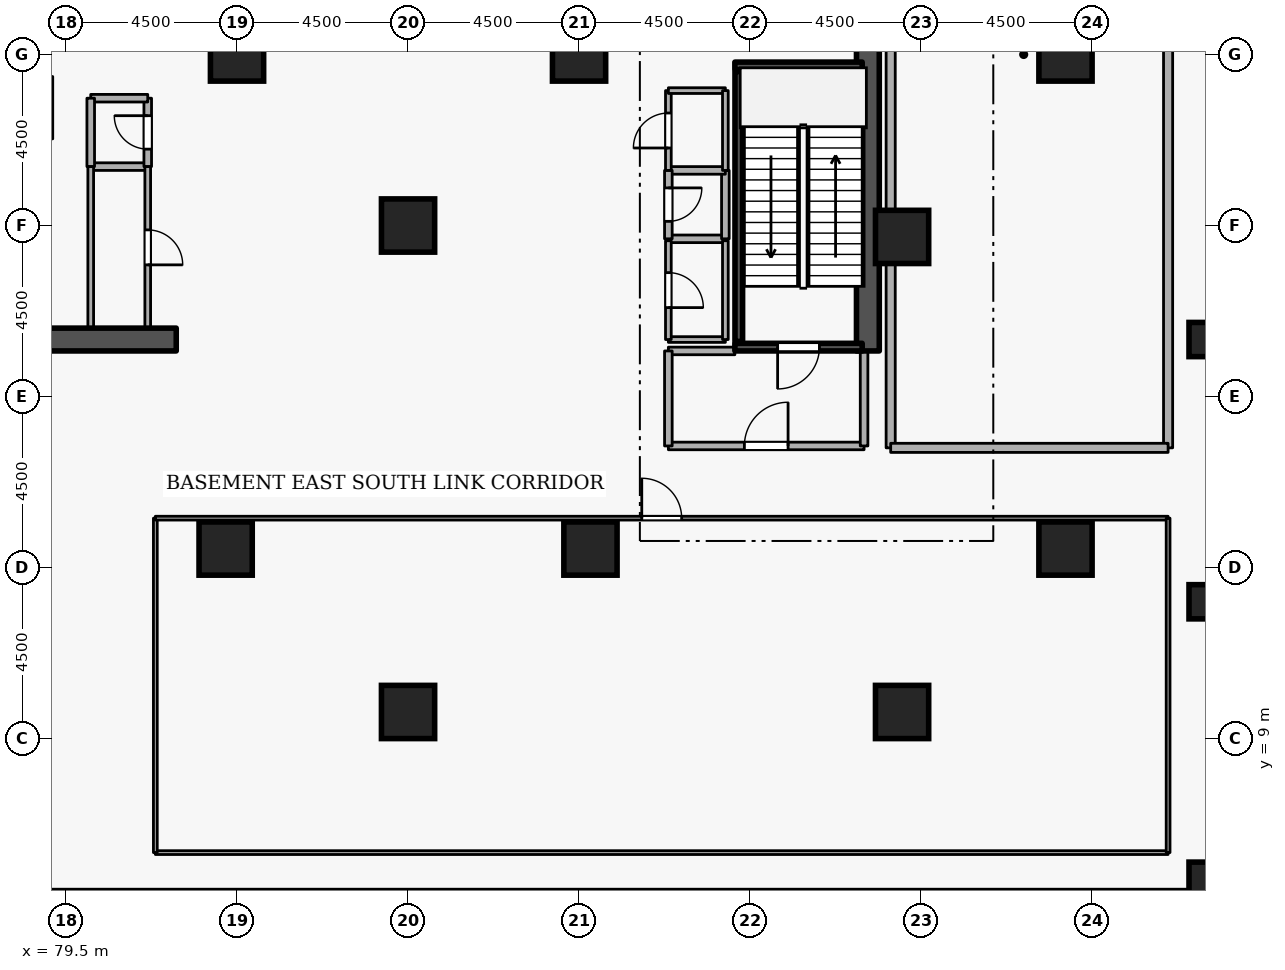
"""IFC4 building model, lengths in metres.
Left out: names, types, materials, properties, quantities, classifications, styles, units other than length and angle.
Written with IfcOpenShell. Run it as: python <this file> out.ifc"""

import sys

from ifc_helpers import new_model, si_unit, direction, frame, frame_2d, origin, origin_2d, place, context, subcontext, project, spatial, rectangle, extrude, element, fill, save


model = new_model("IFC4")
c1 = context("Model", 3, precision=1e-05, world=origin(), true_north=direction((0.0, 1.0)))
c2 = subcontext(c1, "Body", "Model", "MODEL_VIEW")
j1 = project(units=[si_unit("LENGTHUNIT", "METRE"), si_unit("PLANEANGLEUNIT", "RADIAN")], contexts=[c1])
p1 = place(None, origin())
s1 = spatial("IfcSite", under=j1, at=p1, CompositionType="ELEMENT")
p2 = place(p1, origin())
s2 = spatial("IfcBuilding", under=s1, at=p2, CompositionType="ELEMENT")
p3 = place(p2, frame((0.0, 0.0, -5.4)))
s3 = spatial("IfcBuildingStorey", under=s2, at=p3, CompositionType="ELEMENT", Elevation=-5.4)
p4 = place(p3, frame((100.6, 19.2, -0.6), z_axis=(0.0, 0.0, 1.0), x_axis=(0.0, 1.0, 0.0)))
e1 = element("IfcWall", 1, at=p4, inside=s3, PredefinedType="SHEAR", context=c2, shape_type="SweptSolid", body=[
    extrude(rectangle(XDim=15.6, YDim=0.6, at=frame_2d((7.8, 0.0))), origin(), (0.0, 0.0, 1.0), 6.0),
])
p5 = place(p3, frame((76.7, 19.5, -0.6), z_axis=(0.0, 0.0, 1.0), x_axis=(1.0, 0.0, 0.0)))
e2 = element("IfcWall", 2, at=p5, inside=s3, PredefinedType="SHEAR", context=c2, shape_type="SweptSolid", body=[
    extrude(rectangle(XDim=5.7, YDim=0.6, at=frame_2d((2.85, 0.0))), origin(), (0.0, 0.0, 1.0), 6.0),
])
for number, where, z_axis, x_axis in (
    (3, (105.8, 14.0, -0.6), (0.0, 0.0, 1.0), (1.0, 0.0, 0.0)),
    (4, (105.8, 27.0, -0.6), (0.0, 0.0, 1.0), (1.0, 0.0, 0.0)),
    (5, (101.5, 9.7, -0.6), (0.0, 0.0, 1.0), (1.0, 0.0, 0.0)),
    (6, (88.5, 9.7, -0.6), (0.0, 0.0, 1.0), (1.0, 0.0, 0.0)),
    (7, (93.3, 14.0, -0.6), (0.0, 0.0, 1.0), (1.0, 0.0, 0.0)),
    (8, (83.7, 14.0, -0.6), (0.0, 0.0, 1.0), (1.0, 0.0, 0.0)),
    (9, (101.5, 22.2, -0.6), (0.0, 0.0, 1.0), (1.0, 0.0, 0.0)),
    (10, (93.0, 27.0, -0.6), (0.0, 0.0, 1.0), (1.0, 0.0, 0.0)),
    (11, (84.0, 27.0, -0.6), (0.0, 0.0, 1.0), (1.0, 0.0, 0.0)),
    (12, (88.5, 22.5, -0.6), (0.0, 0.0, 1.0), (1.0, 0.0, 0.0)),
):
    element("IfcColumn", number, at=place(p3, frame(where, z_axis=z_axis, x_axis=x_axis)), inside=s3, PredefinedType="COLUMN", context=c2, shape_type="SweptSolid", body=[
        extrude(rectangle(XDim=1.4, YDim=1.4, at=origin_2d()), origin(), (0.0, 0.0, 1.0), 6.0),
    ])
for number, where, z_axis, x_axis in (
    (13, (109.5, 5.3, -0.6), (0.0, 0.0, 1.0), (1.0, 0.0, 0.0)),
    (14, (109.5, 12.6, -0.6), (0.0, 0.0, 1.0), (1.0, 0.0, 0.0)),
    (15, (109.5, 19.5, -0.6), (0.0, 0.0, 1.0), (1.0, 0.0, 0.0)),
):
    element("IfcColumn", number, at=place(p3, frame(where, z_axis=z_axis, x_axis=x_axis)), inside=s3, PredefinedType="COLUMN", context=c2, shape_type="SweptSolid", body=[
        extrude(rectangle(XDim=0.9, YDim=0.9, at=origin_2d()), origin(), (0.0, 0.0, 1.0), 6.0),
    ])
p6 = place(p3, frame((79.05, 24.78, 0.0), z_axis=(0.0, 0.0, 1.0), x_axis=(0.0, 1.0, 0.0)))
e16 = element("IfcWall", 16, at=p6, inside=s3, PredefinedType="STANDARD", context=c2, shape_type="SweptSolid", body=[
    extrude(rectangle(XDim=1.64, YDim=0.2, at=frame_2d((0.82, 0.0))), origin(), (0.0, 0.0, 1.0), 5.06),
])
p7 = place(p6, frame((0.31, 0.0, 0.0)))
e17 = element("IfcOpeningElement", 17, at=p7, cuts=e16, PredefinedType="OPENING", context=c2, shape_type="SweptSolid", body=[
    extrude(rectangle(XDim=1.02, YDim=2.06, at=frame_2d((0.51, 1.03))), frame((0.0, 0.11, 0.0), z_axis=(0.0, -1.0, 0.0), x_axis=(1.0, 0.0, 0.0)), (0.0, 0.0, 1.0), 0.22),
])
p8 = place(p3, frame((100.45, 19.3, -0.6), z_axis=(0.0, 0.0, 1.0), x_axis=(-1.0, 0.0, 0.0)))
e18 = element("IfcWall", 18, at=p8, inside=s3, PredefinedType="SHEAR", context=c2, shape_type="SweptSolid", body=[
    extrude(rectangle(XDim=3.35, YDim=0.2, at=frame_2d((1.675, 0.0))), origin(), (0.0, 0.0, 1.0), 6.0),
])
p9 = place(p8, frame((1.125, 0.0, 0.6)))
e19 = element("IfcOpeningElement", 19, at=p9, cuts=e18, PredefinedType="OPENING", context=c2, shape_type="SweptSolid", body=[
    extrude(rectangle(XDim=1.1, YDim=2.1, at=frame_2d((0.55, 1.05))), frame((0.0, 0.11, 0.0), z_axis=(0.0, -1.0, 0.0), x_axis=(1.0, 0.0, 0.0)), (0.0, 0.0, 1.0), 0.22),
])
p10 = place(p3, frame((97.1, 26.7, -0.6), z_axis=(0.0, 0.0, 1.0), x_axis=(1.0, 0.0, 0.0)))
e20 = element("IfcWall", 20, at=p10, inside=s3, PredefinedType="SHEAR", context=c2, shape_type="SweptSolid", body=[
    extrude(rectangle(XDim=3.35, YDim=0.2, at=frame_2d((1.675, 0.0))), origin(), (0.0, 0.0, 1.0), 6.0),
])
p11 = place(p3, frame((97.203, 26.55, -0.6), z_axis=(0.0, 0.0, 1.0), x_axis=(0.0, -1.0, 0.0)))
e21 = element("IfcWall", 21, at=p11, inside=s3, PredefinedType="SHEAR", context=c2, shape_type="SweptSolid", body=[
    extrude(rectangle(XDim=7.1, YDim=0.2, at=frame_2d((3.55, 0.0))), origin(), (0.0, 0.0, 1.0), 6.0),
])
p12 = place(p3, frame((95.35, 16.7, 0.0), z_axis=(0.0, 0.0, 1.0), x_axis=(1.0, 0.0, 0.0)))
e22 = element("IfcWall", 22, at=p12, inside=s3, PredefinedType="STANDARD", context=c2, shape_type="SweptSolid", body=[
    extrude(rectangle(XDim=5.15, YDim=0.2, at=frame_2d((2.575, 0.0))), origin(), (0.0, 0.0, 1.0), 5.06),
])
p13 = place(p12, frame((2.0, 0.0, 0.0)))
e23 = element("IfcOpeningElement", 23, at=p13, cuts=e22, PredefinedType="OPENING", context=c2, shape_type="SweptSolid", body=[
    extrude(rectangle(XDim=1.15, YDim=2.1, at=frame_2d((0.575, 1.05))), frame((0.0, 0.11, 0.0), z_axis=(0.0, -1.0, 0.0), x_axis=(1.0, 0.0, 0.0)), (0.0, 0.0, 1.0), 0.22),
])
p14 = place(p3, frame((100.5, 16.7, 0.0), z_axis=(0.0, 0.0, 1.0), x_axis=(0.0, 1.0, 0.0)))
e24 = element("IfcWall", 24, at=p14, inside=s3, PredefinedType="STANDARD", context=c2, shape_type="SweptSolid", body=[
    extrude(rectangle(XDim=2.5, YDim=0.2, at=frame_2d((1.25, 0.0))), origin(), (0.0, 0.0, 1.0), 5.06),
])
p15 = place(p3, frame((97.1, 19.2, 0.0), z_axis=(0.0, 0.0, 1.0), x_axis=(-1.0, 0.0, 0.0)))
e25 = element("IfcWall", 25, at=p15, inside=s3, PredefinedType="STANDARD", context=c2, shape_type="SweptSolid", body=[
    extrude(rectangle(XDim=1.75, YDim=0.2, at=frame_2d((0.875, 0.0))), origin(), (0.0, 0.0, 1.0), 4.265),
])
p16 = place(p3, frame((95.35, 19.2, 0.0), z_axis=(0.0, 0.0, 1.0), x_axis=(0.0, -1.0, 0.0)))
e26 = element("IfcWall", 26, at=p16, inside=s3, PredefinedType="STANDARD", context=c2, shape_type="SweptSolid", body=[
    extrude(rectangle(XDim=2.5, YDim=0.2, at=frame_2d((1.25, 0.0))), origin(), (0.0, 0.0, 1.0), 5.06),
])
p17 = place(p3, frame((95.35, 22.15, 0.0), z_axis=(0.0, 0.0, 1.0), x_axis=(1.0, 0.0, 0.0)))
e27 = element("IfcWall", 27, at=p17, inside=s3, PredefinedType="STANDARD", context=c2, shape_type="SweptSolid", body=[
    extrude(rectangle(XDim=1.5, YDim=0.2, at=frame_2d((0.75, 0.0))), origin(), (0.0, 0.0, 1.0), 5.06),
])
p18 = place(p3, frame((96.85, 22.15, 0.0), z_axis=(0.0, 0.0, 1.0), x_axis=(0.0, 1.0, 0.0)))
e28 = element("IfcWall", 28, at=p18, inside=s3, PredefinedType="STANDARD", context=c2, shape_type="SweptSolid", body=[
    extrude(rectangle(XDim=1.8, YDim=0.2, at=frame_2d((0.9, 0.0))), origin(), (0.0, 0.0, 1.0), 5.06),
])
p19 = place(p3, frame((96.85, 23.95, 0.0), z_axis=(0.0, 0.0, 1.0), x_axis=(-1.0, 0.0, 0.0)))
e29 = element("IfcWall", 29, at=p19, inside=s3, PredefinedType="STANDARD", context=c2, shape_type="SweptSolid", body=[
    extrude(rectangle(XDim=1.5, YDim=0.2, at=frame_2d((0.75, 0.0))), origin(), (0.0, 0.0, 1.0), 5.06),
])
p20 = place(p3, frame((95.35, 23.95, 0.0), z_axis=(0.0, 0.0, 1.0), x_axis=(0.0, -1.0, 0.0)))
e30 = element("IfcWall", 30, at=p20, inside=s3, PredefinedType="STANDARD", context=c2, shape_type="SweptSolid", body=[
    extrude(rectangle(XDim=1.8, YDim=0.2, at=frame_2d((0.9, 0.0))), origin(), (0.0, 0.0, 1.0), 5.06),
])
p21 = place(p20, frame((0.46, 0.0, 0.0)))
e31 = element("IfcOpeningElement", 31, at=p21, cuts=e30, PredefinedType="OPENING", context=c2, shape_type="SweptSolid", body=[
    extrude(rectangle(XDim=0.88, YDim=2.04, at=frame_2d((0.44, 1.02))), frame((0.0, 0.11, 0.0), z_axis=(0.0, -1.0, 0.0), x_axis=(1.0, 0.0, 0.0)), (0.0, 0.0, 1.0), 0.22),
])
p22 = place(p3, frame((80.15, 24.05, 0.0), z_axis=(0.0, 0.0, 1.0), x_axis=(1.0, 0.0, 0.0)))
e32 = element("IfcWall", 32, at=p22, inside=s3, PredefinedType="STANDARD", context=c2, shape_type="SweptSolid", body=[
    extrude(rectangle(XDim=1.5, YDim=0.2, at=frame_2d((0.75, 0.0))), origin(), (0.0, 0.0, 1.0), 5.06),
])
p23 = place(p3, frame((81.65, 24.05, 0.0), z_axis=(0.0, 0.0, 1.0), x_axis=(0.0, 1.0, 0.0)))
e33 = element("IfcWall", 33, at=p23, inside=s3, PredefinedType="STANDARD", context=c2, shape_type="SweptSolid", body=[
    extrude(rectangle(XDim=1.8, YDim=0.2, at=frame_2d((0.9, 0.0))), origin(), (0.0, 0.0, 1.0), 5.06),
])
p24 = place(p23, frame((0.46, 0.0, 0.0)))
e34 = element("IfcOpeningElement", 34, at=p24, cuts=e33, PredefinedType="OPENING", context=c2, shape_type="SweptSolid", body=[
    extrude(rectangle(XDim=0.88, YDim=2.04, at=frame_2d((0.44, 1.02))), frame((0.0, 0.11, 0.0), z_axis=(0.0, -1.0, 0.0), x_axis=(1.0, 0.0, 0.0)), (0.0, 0.0, 1.0), 0.22),
])
p25 = place(p3, frame((81.65, 25.85, 0.0), z_axis=(0.0, 0.0, 1.0), x_axis=(-1.0, 0.0, 0.0)))
e35 = element("IfcWall", 35, at=p25, inside=s3, PredefinedType="STANDARD", context=c2, shape_type="SweptSolid", body=[
    extrude(rectangle(XDim=1.5, YDim=0.2, at=frame_2d((0.75, 0.0))), origin(), (0.0, 0.0, 1.0), 5.06),
])
p26 = place(p3, frame((80.15, 25.85, 0.0), z_axis=(0.0, 0.0, 1.0), x_axis=(0.0, -1.0, 0.0)))
e36 = element("IfcWall", 36, at=p26, inside=s3, PredefinedType="STANDARD", context=c2, shape_type="SweptSolid", body=[
    extrude(rectangle(XDim=1.8, YDim=0.2, at=frame_2d((0.9, 0.0))), origin(), (0.0, 0.0, 1.0), 5.06),
])
for number, where, z_axis, x_axis in (
    (37, (101.2, 16.65, 0.0), (0.0, 0.0, 1.0), (0.0, 1.0, 0.0)),
    (38, (108.5, 40.8, 0.0), (0.0, 0.0, 1.0), (0.0, -1.0, 0.0)),
):
    element("IfcWall", number, at=place(p3, frame(where, z_axis=z_axis, x_axis=x_axis)), inside=s3, PredefinedType="STANDARD", context=c2, shape_type="SweptSolid", body=[
        extrude(rectangle(XDim=24.15, YDim=0.24, at=frame_2d((12.075, 0.0))), origin(), (0.0, 0.0, 1.0), 5.06),
    ])
p27 = place(p3, frame((108.5, 16.65, 0.0), z_axis=(0.0, 0.0, 1.0), x_axis=(-1.0, 0.0, 0.0)))
e39 = element("IfcWall", 39, at=p27, inside=s3, PredefinedType="STANDARD", context=c2, shape_type="SweptSolid", body=[
    extrude(rectangle(XDim=7.3, YDim=0.24, at=frame_2d((3.65, 0.0))), origin(), (0.0, 0.0, 1.0), 5.06),
])
p28 = place(p3, frame((95.35, 19.5, 0.0), z_axis=(0.0, 0.0, 1.0), x_axis=(1.0, 0.0, 0.0)))
e40 = element("IfcWall", 40, at=p28, inside=s3, PredefinedType="PARTITIONING", context=c2, shape_type="SweptSolid", body=[
    extrude(rectangle(XDim=1.5, YDim=0.15, at=frame_2d((0.75, 0.0))), origin(), (0.0, 0.0, 1.0), 4.265),
])
p29 = place(p3, frame((96.85, 19.5, 0.0), z_axis=(0.0, 0.0, 1.0), x_axis=(0.0, 1.0, 0.0)))
e41 = element("IfcWall", 41, at=p29, inside=s3, PredefinedType="PARTITIONING", context=c2, shape_type="SweptSolid", body=[
    extrude(rectangle(XDim=2.6, YDim=0.15, at=frame_2d((1.3, 0.0))), origin(), (0.0, 0.0, 1.0), 5.06),
])
p30 = place(p3, frame((95.35, 22.1, 0.0), z_axis=(0.0, 0.0, 1.0), x_axis=(0.0, -1.0, 0.0)))
e42 = element("IfcWall", 42, at=p30, inside=s3, PredefinedType="PARTITIONING", context=c2, shape_type="SweptSolid", body=[
    extrude(rectangle(XDim=2.6, YDim=0.15, at=frame_2d((1.3, 0.0))), origin(), (0.0, 0.0, 1.0), 5.06),
])
p31 = place(p30, frame((0.84, 0.0, 0.0)))
e43 = element("IfcOpeningElement", 43, at=p31, cuts=e42, PredefinedType="OPENING", context=c2, shape_type="SweptSolid", body=[
    extrude(rectangle(XDim=0.92, YDim=2.08, at=frame_2d((0.46, 1.04))), frame((0.0, 0.085, 0.0), z_axis=(0.0, -1.0, 0.0), x_axis=(1.0, 0.0, 0.0)), (0.0, 0.0, 1.0), 0.17),
])
p32 = place(p3, frame((95.35, 23.95, 0.0), z_axis=(0.0, 0.0, 1.0), x_axis=(0.0, 1.0, 0.0)))
e44 = element("IfcWall", 44, at=p32, inside=s3, PredefinedType="PARTITIONING", context=c2, shape_type="SweptSolid", body=[
    extrude(rectangle(XDim=2.1, YDim=0.15, at=frame_2d((1.05, 0.0))), origin(), (0.0, 0.0, 1.0), 5.06),
])
p33 = place(p32, frame((0.59, 0.0, 0.0)))
e45 = element("IfcOpeningElement", 45, at=p33, cuts=e44, PredefinedType="OPENING", context=c2, shape_type="SweptSolid", body=[
    extrude(rectangle(XDim=0.92, YDim=2.08, at=frame_2d((0.46, 1.04))), frame((0.0, 0.085, 0.0), z_axis=(0.0, -1.0, 0.0), x_axis=(1.0, 0.0, 0.0)), (0.0, 0.0, 1.0), 0.17),
])
p34 = place(p3, frame((95.35, 26.05, 0.0), z_axis=(0.0, 0.0, 1.0), x_axis=(1.0, 0.0, 0.0)))
e46 = element("IfcWall", 46, at=p34, inside=s3, PredefinedType="PARTITIONING", context=c2, shape_type="SweptSolid", body=[
    extrude(rectangle(XDim=1.5, YDim=0.15, at=frame_2d((0.75, 0.0))), origin(), (0.0, 0.0, 1.0), 5.06),
])
p35 = place(p3, frame((96.85, 26.05, 0.0), z_axis=(0.0, 0.0, 1.0), x_axis=(0.0, -1.0, 0.0)))
e47 = element("IfcWall", 47, at=p35, inside=s3, PredefinedType="PARTITIONING", context=c2, shape_type="SweptSolid", body=[
    extrude(rectangle(XDim=2.1, YDim=0.15, at=frame_2d((1.05, 0.0))), origin(), (0.0, 0.0, 1.0), 5.06),
])
p36 = place(p3, frame((80.15, 19.8, 0.0), z_axis=(0.0, 0.0, 1.0), x_axis=(0.0, 1.0, 0.0)))
e48 = element("IfcWall", 48, at=p36, inside=s3, PredefinedType="PARTITIONING", context=c2, shape_type="SweptSolid", body=[
    extrude(rectangle(XDim=4.25, YDim=0.15, at=frame_2d((2.125, 0.0))), origin(), (0.0, 0.0, 1.0), 5.06),
])
p37 = place(p3, frame((81.65, 24.05, 0.0), z_axis=(0.0, 0.0, 1.0), x_axis=(0.0, -1.0, 0.0)))
e49 = element("IfcWall", 49, at=p37, inside=s3, PredefinedType="PARTITIONING", context=c2, shape_type="SweptSolid", body=[
    extrude(rectangle(XDim=4.25, YDim=0.15, at=frame_2d((2.125, 0.0))), origin(), (0.0, 0.0, 1.0), 5.06),
])
p38 = place(p37, frame((1.665, 0.0, 0.0)))
e50 = element("IfcOpeningElement", 50, at=p38, cuts=e49, PredefinedType="OPENING", context=c2, shape_type="SweptSolid", body=[
    extrude(rectangle(XDim=0.92, YDim=2.08, at=frame_2d((0.46, 1.04))), frame((0.0, 0.085, 0.0), z_axis=(0.0, -1.0, 0.0), x_axis=(1.0, 0.0, 0.0)), (0.0, 0.0, 1.0), 0.17),
])
p39 = place(p3, frame((108.5, 6.0, 0.0), z_axis=(0.0, 0.0, 1.0), x_axis=(-1.0, 0.0, 0.0)))
e51 = element("IfcWall", 51, at=p39, inside=s3, PredefinedType="PARTITIONING", context=c2, shape_type="SweptSolid", body=[
    extrude(rectangle(XDim=26.65, YDim=0.1, at=frame_2d((13.325, 0.0))), origin(), (0.0, 0.0, 1.0), 5.06),
])
p40 = place(p3, frame((81.85, 6.0, 0.0), z_axis=(0.0, 0.0, 1.0), x_axis=(0.0, 1.0, 0.0)))
e52 = element("IfcWall", 52, at=p40, inside=s3, PredefinedType="PARTITIONING", context=c2, shape_type="SweptSolid", body=[
    extrude(rectangle(XDim=8.8, YDim=0.1, at=frame_2d((4.4, 0.0))), origin(), (0.0, 0.0, 1.0), 5.06),
])
p41 = place(p3, frame((81.85, 14.8, 0.0), z_axis=(0.0, 0.0, 1.0), x_axis=(1.0, 0.0, 0.0)))
e53 = element("IfcWall", 53, at=p41, inside=s3, PredefinedType="PARTITIONING", context=c2, shape_type="SweptSolid", body=[
    extrude(rectangle(XDim=26.65, YDim=0.1, at=frame_2d((13.325, 0.0))), origin(), (0.0, 0.0, 1.0), 5.06),
])
p42 = place(p41, frame((12.8, 0.0, 0.0)))
e54 = element("IfcOpeningElement", 54, at=p42, cuts=e53, PredefinedType="OPENING", context=c2, shape_type="SweptSolid", body=[
    extrude(rectangle(XDim=1.05, YDim=2.1, at=frame_2d((0.525, 1.05))), frame((0.0, 0.06, 0.0), z_axis=(0.0, -1.0, 0.0), x_axis=(1.0, 0.0, 0.0)), (0.0, 0.0, 1.0), 0.12),
])
p43 = place(p3, frame((108.5, 14.8, 0.0), z_axis=(0.0, 0.0, 1.0), x_axis=(0.0, -1.0, 0.0)))
e55 = element("IfcWall", 55, at=p43, inside=s3, PredefinedType="PARTITIONING", context=c2, shape_type="SweptSolid", body=[
    extrude(rectangle(XDim=8.8, YDim=0.1, at=frame_2d((4.4, 0.0))), origin(), (0.0, 0.0, 1.0), 5.06),
])
p44 = place(p9, origin())
e56 = element("IfcDoor", 56, at=p44, inside=s3, OperationType="SINGLE_SWING_RIGHT", PredefinedType="DOOR", context=c2, shape_type="SweptSolid", body=[
    extrude(rectangle(XDim=1.1, YDim=2.1, at=frame_2d((0.55, 1.05))), frame((0.0, 0.025, 0.0), z_axis=(0.0, -1.0, 0.0), x_axis=(1.0, 0.0, 0.0)), (0.0, 0.0, 1.0), 0.05),
])
fill(e19, e56)
p45 = place(p13, origin())
e57 = element("IfcDoor", 57, at=p45, inside=s3, OperationType="SINGLE_SWING_RIGHT", PredefinedType="DOOR", context=c2, shape_type="SweptSolid", body=[
    extrude(rectangle(XDim=1.15, YDim=2.1, at=frame_2d((0.575, 1.05))), frame((0.0, 0.025, 0.0), z_axis=(0.0, -1.0, 0.0), x_axis=(1.0, 0.0, 0.0)), (0.0, 0.0, 1.0), 0.05),
])
fill(e23, e57)
p46 = place(p21, origin())
e58 = element("IfcDoor", 58, at=p46, inside=s3, OperationType="SINGLE_SWING_LEFT", PredefinedType="DOOR", context=c2, shape_type="SweptSolid", body=[
    extrude(rectangle(XDim=0.88, YDim=2.04, at=frame_2d((0.44, 1.02))), frame((0.0, 0.025, 0.0), z_axis=(0.0, -1.0, 0.0), x_axis=(1.0, 0.0, 0.0)), (0.0, 0.0, 1.0), 0.05),
])
fill(e31, e58)
p47 = place(p24, origin())
e59 = element("IfcDoor", 59, at=p47, inside=s3, OperationType="SINGLE_SWING_RIGHT", PredefinedType="DOOR", context=c2, shape_type="SweptSolid", body=[
    extrude(rectangle(XDim=0.88, YDim=2.04, at=frame_2d((0.44, 1.02))), frame((0.0, 0.025, 0.0), z_axis=(0.0, -1.0, 0.0), x_axis=(1.0, 0.0, 0.0)), (0.0, 0.0, 1.0), 0.05),
])
fill(e34, e59)
p48 = place(p31, origin())
e60 = element("IfcDoor", 60, at=p48, inside=s3, OperationType="SINGLE_SWING_RIGHT", PredefinedType="DOOR", context=c2, shape_type="SweptSolid", body=[
    extrude(rectangle(XDim=0.92, YDim=2.08, at=frame_2d((0.46, 1.04))), frame((0.0, 0.025, 0.0), z_axis=(0.0, -1.0, 0.0), x_axis=(1.0, 0.0, 0.0)), (0.0, 0.0, 1.0), 0.05),
])
fill(e43, e60)
p49 = place(p33, origin())
e61 = element("IfcDoor", 61, at=p49, inside=s3, OperationType="SINGLE_SWING_LEFT", PredefinedType="DOOR", context=c2, shape_type="SweptSolid", body=[
    extrude(rectangle(XDim=0.92, YDim=2.08, at=frame_2d((0.46, 1.04))), frame((0.0, 0.025, 0.0), z_axis=(0.0, -1.0, 0.0), x_axis=(1.0, 0.0, 0.0)), (0.0, 0.0, 1.0), 0.05),
])
fill(e45, e61)
p50 = place(p38, origin())
e62 = element("IfcDoor", 62, at=p50, inside=s3, OperationType="SINGLE_SWING_RIGHT", PredefinedType="DOOR", context=c2, shape_type="SweptSolid", body=[
    extrude(rectangle(XDim=0.92, YDim=2.08, at=frame_2d((0.46, 1.04))), frame((0.0, 0.025, 0.0), z_axis=(0.0, -1.0, 0.0), x_axis=(1.0, 0.0, 0.0)), (0.0, 0.0, 1.0), 0.05),
])
fill(e50, e62)
p51 = place(p42, origin())
e63 = element("IfcDoor", 63, at=p51, inside=s3, OperationType="SINGLE_SWING_LEFT", PredefinedType="DOOR", context=c2, shape_type="SweptSolid", body=[
    extrude(rectangle(XDim=1.05, YDim=2.1, at=frame_2d((0.525, 1.05))), frame((0.0, 0.025, 0.0), z_axis=(0.0, -1.0, 0.0), x_axis=(1.0, 0.0, 0.0)), (0.0, 0.0, 1.0), 0.05),
])
fill(e54, e63)
save(model, sys.argv[1])
